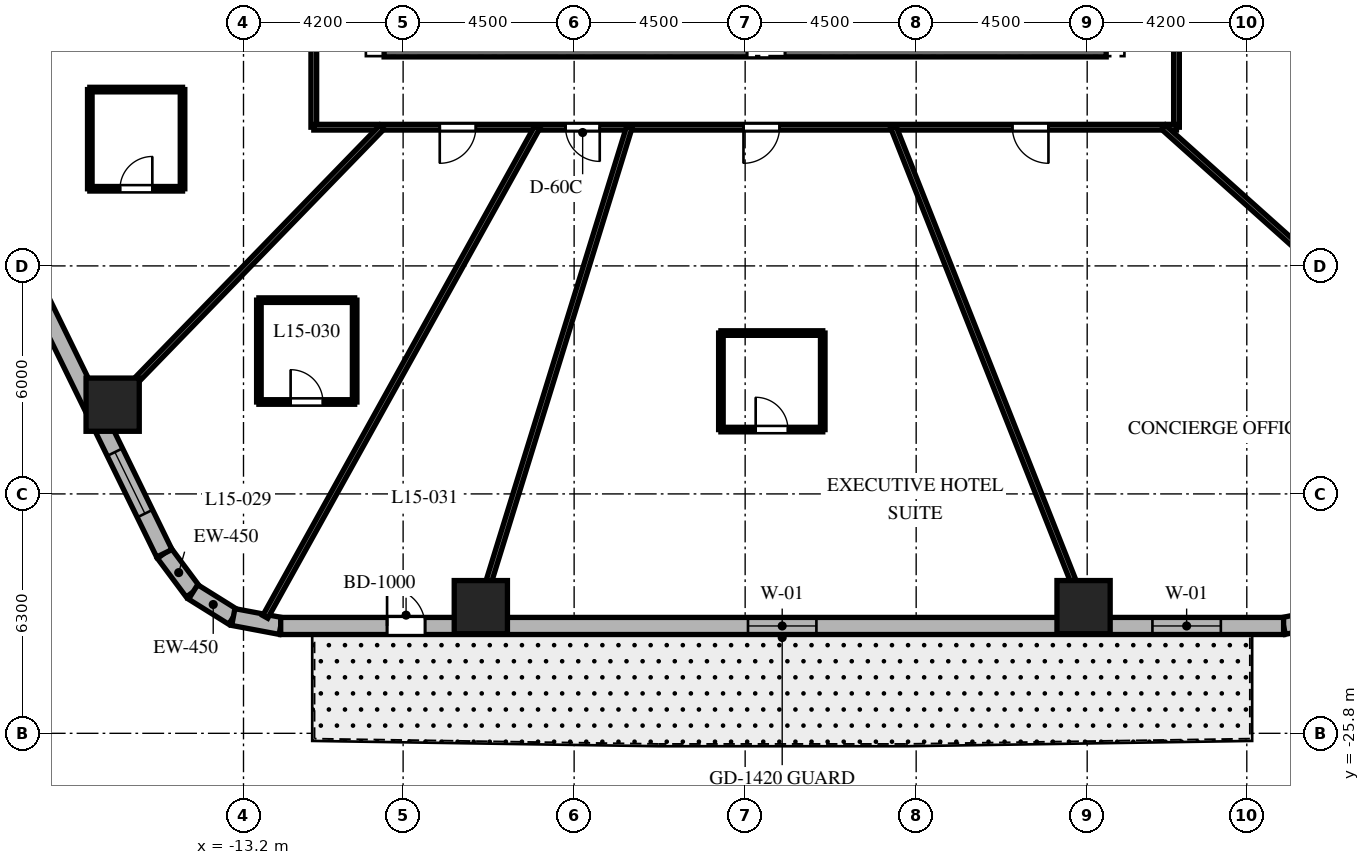
"""IFC4 building model, lengths in metres.
Left out: names, types, materials, properties, quantities, classifications, styles, units other than length and angle.
Written with IfcOpenShell. Run it as: python <this file> out.ifc"""

import sys

from ifc_helpers import new_model, si_unit, direction, frame, frame_2d, origin, origin_2d, place, context, subcontext, project, spatial, rectangle, extrude, element, fill, save


model = new_model("IFC4")
c1 = context("Model", 3, precision=1e-05, world=origin(), true_north=direction((0.0, 1.0)))
c2 = subcontext(c1, "Body", "Model", "MODEL_VIEW")
j1 = project(units=[si_unit("LENGTHUNIT", "METRE"), si_unit("PLANEANGLEUNIT", "RADIAN")], contexts=[c1])
p1 = place(None, origin())
s1 = spatial("IfcSite", under=j1, at=p1, CompositionType="ELEMENT")
p2 = place(p1, origin())
s2 = spatial("IfcBuilding", under=s1, at=p2, CompositionType="ELEMENT")
p3 = place(p2, frame((0.0, 0.0, 67.5)))
s3 = spatial("IfcBuildingStorey", under=s2, at=p3, CompositionType="ELEMENT", Elevation=67.5)
p4 = place(p3, frame((-9.5, -7.5, 0.0), z_axis=(0.0, 0.0, 1.0), x_axis=(1.0, 0.0, 0.0)))
e1 = element("IfcWall", 1, at=p4, inside=s3, PredefinedType="SHEAR", context=c2, shape_type="SweptSolid", body=[
    extrude(rectangle(XDim=19.0, YDim=1.0, at=frame_2d((9.5, 0.0))), origin(), (0.0, 0.0, 1.0), 3.7),
])
p5 = place(p4, frame((9.55, 0.0, 0.0)))
e2 = element("IfcOpeningElement", 2, at=p5, cuts=e1, PredefinedType="OPENING", context=c2, shape_type="SweptSolid", body=[
    extrude(rectangle(XDim=1.0, YDim=2.15, at=frame_2d((0.5, 1.075))), frame((0.0, 0.51, 0.0), z_axis=(0.0, -1.0, 0.0), x_axis=(1.0, 0.0, 0.0)), (0.0, 0.0, 1.0), 1.02),
])
for number, where, z_axis, x_axis in (
    (3, (-6.955, -22.48, 0.0), (0.0, 0.0, 1.0), (1.0, 0.0, 0.0)),
    (4, (8.905, -22.48, 0.0), (0.0, 0.0, 1.0), (1.0, 0.0, 0.0)),
    (5, (-16.643, -17.152, 0.0), (0.0, 0.0, 1.0), (1.0, 0.0, 0.0)),
):
    element("IfcColumn", number, at=place(p3, frame(where, z_axis=z_axis, x_axis=x_axis)), inside=s3, PredefinedType="COLUMN", context=c2, shape_type="SweptSolid", body=[
        extrude(rectangle(XDim=1.4, YDim=1.4, at=origin_2d()), origin(), (0.0, 0.0, 1.0), 3.7),
    ])
p6 = place(p3, frame((-15.284, -21.062, 0.0), z_axis=(0.0, 0.0, 1.0), x_axis=(0.597595366449, -0.801797841104, 0.0)))
e6 = element("IfcWall", 6, at=p6, inside=s3, PredefinedType="SOLIDWALL", context=c2, shape_type="SweptSolid", body=[
    extrude(rectangle(XDim=1.269, YDim=0.45, at=frame_2d((0.634, 0.0))), origin(), (0.0, 0.0, 1.0), 3.4),
])
p7 = place(p3, frame((-14.526, -22.08, 0.0), z_axis=(0.0, 0.0, 1.0), x_axis=(0.848185203596, -0.529699783275, 0.0)))
e7 = element("IfcWall", 7, at=p7, inside=s3, PredefinedType="SOLIDWALL", context=c2, shape_type="SweptSolid", body=[
    extrude(rectangle(XDim=1.247, YDim=0.45, at=frame_2d((0.624, 0.0))), origin(), (0.0, 0.0, 1.0), 3.4),
])
p8 = place(p3, frame((-13.468, -22.74, 0.0), z_axis=(0.0, 0.0, 1.0), x_axis=(0.982717174228, -0.185113358451, 0.0)))
e8 = element("IfcWall", 8, at=p8, inside=s3, PredefinedType="SOLIDWALL", context=c2, shape_type="SweptSolid", body=[
    extrude(rectangle(XDim=1.269, YDim=0.45, at=frame_2d((0.634, 0.0))), origin(), (0.0, 0.0, 1.0), 3.4),
])
p9 = place(p3, frame((14.168, -22.975, 0.0), z_axis=(0.0, 0.0, 1.0), x_axis=(0.978770371074, 0.204959900243, 0.0)))
e9 = element("IfcWall", 9, at=p9, inside=s3, PredefinedType="SOLIDWALL", context=c2, shape_type="SweptSolid", body=[
    extrude(rectangle(XDim=1.406, YDim=0.45, at=frame_2d((0.703, 0.0))), origin(), (0.0, 0.0, 1.0), 3.4),
])
p10 = place(p3, frame((-12.221, -22.975, 0.0), z_axis=(0.0, 0.0, 1.0), x_axis=(1.0, 0.0, 0.0)))
e10 = element("IfcWall", 10, at=p10, inside=s3, PredefinedType="SOLIDWALL", context=c2, shape_type="SweptSolid", body=[
    extrude(rectangle(XDim=26.389, YDim=0.45, at=frame_2d((13.195, 0.0))), origin(), (0.0, 0.0, 1.0), 3.4),
])
p11 = place(p10, frame((2.799, 0.0, 0.0)))
e11 = element("IfcOpeningElement", 11, at=p11, cuts=e10, PredefinedType="OPENING", context=c2, shape_type="SweptSolid", body=[
    extrude(rectangle(XDim=1.0, YDim=2.15, at=frame_2d((0.5, 1.075))), frame((0.0, 0.235, 0.0), z_axis=(0.0, -1.0, 0.0), x_axis=(1.0, 0.0, 0.0)), (0.0, 0.0, 1.0), 0.47),
])
p12 = place(p10, frame((12.296, 0.0, 0.8)))
e12 = element("IfcOpeningElement", 12, at=p12, cuts=e10, PredefinedType="OPENING", context=c2, shape_type="SweptSolid", body=[
    extrude(rectangle(XDim=1.8, YDim=1.8, at=frame_2d((0.9, 0.9))), frame((0.0, 0.235, 0.0), z_axis=(0.0, -1.0, 0.0), x_axis=(1.0, 0.0, 0.0)), (0.0, 0.0, 1.0), 0.47),
])
p13 = place(p10, frame((22.938, 0.0, 0.8)))
e13 = element("IfcOpeningElement", 13, at=p13, cuts=e10, PredefinedType="OPENING", context=c2, shape_type="SweptSolid", body=[
    extrude(rectangle(XDim=1.8, YDim=1.8, at=frame_2d((0.9, 0.9))), frame((0.0, 0.235, 0.0), z_axis=(0.0, -1.0, 0.0), x_axis=(1.0, 0.0, 0.0)), (0.0, 0.0, 1.0), 0.47),
])
p14 = place(p3, frame((-24.336, -2.532, 0.0), z_axis=(0.0, 0.0, 1.0), x_axis=(0.438931326393, -0.898520612291, 0.0)))
e14 = element("IfcWall", 14, at=p14, inside=s3, PredefinedType="SOLIDWALL", context=c2, shape_type="SweptSolid", body=[
    extrude(rectangle(XDim=20.623, YDim=0.45, at=frame_2d((10.312, 0.0))), origin(), (0.0, 0.0, 1.0), 3.4),
])
p15 = place(p14, frame((1.214, 0.0, 0.8)))
e15 = element("IfcOpeningElement", 15, at=p15, cuts=e14, PredefinedType="OPENING", context=c2, shape_type="SweptSolid", body=[
    extrude(rectangle(XDim=1.8, YDim=1.8, at=frame_2d((0.9, 0.9))), frame((0.0, 0.235, 0.0), z_axis=(0.0, -1.0, 0.0), x_axis=(1.0, 0.0, 0.0)), (0.0, 0.0, 1.0), 0.47),
])
p16 = place(p14, frame((9.462, 0.0, 0.8)))
e16 = element("IfcOpeningElement", 16, at=p16, cuts=e14, PredefinedType="OPENING", context=c2, shape_type="SweptSolid", body=[
    extrude(rectangle(XDim=1.8, YDim=1.8, at=frame_2d((0.9, 0.9))), frame((0.0, 0.235, 0.0), z_axis=(0.0, -1.0, 0.0), x_axis=(1.0, 0.0, 0.0)), (0.0, 0.0, 1.0), 0.47),
])
p17 = place(p14, frame((17.66, 0.0, 0.8)))
e17 = element("IfcOpeningElement", 17, at=p17, cuts=e14, PredefinedType="OPENING", context=c2, shape_type="SweptSolid", body=[
    extrude(rectangle(XDim=1.8, YDim=1.8, at=frame_2d((0.9, 0.9))), frame((0.0, 0.235, 0.0), z_axis=(0.0, -1.0, 0.0), x_axis=(1.0, 0.0, 0.0)), (0.0, 0.0, 1.0), 0.47),
])
p18 = place(p3, frame((-11.35, -9.85, 0.0), z_axis=(0.0, 0.0, 1.0), x_axis=(0.0, 1.0, 0.0)))
e18 = element("IfcWall", 18, at=p18, inside=s3, PredefinedType="PARTITIONING", context=c2, shape_type="SweptSolid", body=[
    extrude(rectangle(XDim=19.7, YDim=0.15, at=frame_2d((9.85, 0.0))), origin(), (0.0, 0.0, 1.0), 2.84),
])
p19 = place(p18, frame((16.714, 0.0, 0.0)))
e19 = element("IfcOpeningElement", 19, at=p19, cuts=e18, PredefinedType="OPENING", context=c2, shape_type="SweptSolid", body=[
    extrude(rectangle(XDim=0.95, YDim=2.03, at=frame_2d((0.475, 1.015))), frame((0.0, 0.085, 0.0), z_axis=(0.0, -1.0, 0.0), x_axis=(1.0, 0.0, 0.0)), (0.0, 0.0, 1.0), 0.17),
])
p20 = place(p18, frame((12.932, 0.0, 0.0)))
e20 = element("IfcOpeningElement", 20, at=p20, cuts=e18, PredefinedType="OPENING", context=c2, shape_type="SweptSolid", body=[
    extrude(rectangle(XDim=0.95, YDim=2.03, at=frame_2d((0.475, 1.015))), frame((0.0, 0.085, 0.0), z_axis=(0.0, -1.0, 0.0), x_axis=(1.0, 0.0, 0.0)), (0.0, 0.0, 1.0), 0.17),
])
p21 = place(p18, frame((8.838, 0.0, 0.0)))
e21 = element("IfcOpeningElement", 21, at=p21, cuts=e18, PredefinedType="OPENING", context=c2, shape_type="SweptSolid", body=[
    extrude(rectangle(XDim=0.95, YDim=2.03, at=frame_2d((0.475, 1.015))), frame((0.0, 0.085, 0.0), z_axis=(0.0, -1.0, 0.0), x_axis=(1.0, 0.0, 0.0)), (0.0, 0.0, 1.0), 0.17),
])
p22 = place(p18, frame((3.024, 0.0, 0.0)))
e22 = element("IfcOpeningElement", 22, at=p22, cuts=e18, PredefinedType="OPENING", context=c2, shape_type="SweptSolid", body=[
    extrude(rectangle(XDim=0.95, YDim=2.03, at=frame_2d((0.475, 1.015))), frame((0.0, 0.085, 0.0), z_axis=(0.0, -1.0, 0.0), x_axis=(1.0, 0.0, 0.0)), (0.0, 0.0, 1.0), 0.17),
])
p23 = place(p3, frame((11.35, 9.85, 0.0), z_axis=(0.0, 0.0, 1.0), x_axis=(0.0, -1.0, 0.0)))
e23 = element("IfcWall", 23, at=p23, inside=s3, PredefinedType="PARTITIONING", context=c2, shape_type="SweptSolid", body=[
    extrude(rectangle(XDim=19.7, YDim=0.15, at=frame_2d((9.85, 0.0))), origin(), (0.0, 0.0, 1.0), 2.84),
])
p24 = place(p23, frame((3.024, 0.0, 0.0)))
e24 = element("IfcOpeningElement", 24, at=p24, cuts=e23, PredefinedType="OPENING", context=c2, shape_type="SweptSolid", body=[
    extrude(rectangle(XDim=0.95, YDim=2.03, at=frame_2d((0.475, 1.015))), frame((0.0, 0.085, 0.0), z_axis=(0.0, -1.0, 0.0), x_axis=(1.0, 0.0, 0.0)), (0.0, 0.0, 1.0), 0.17),
])
p25 = place(p23, frame((15.191, 0.0, 0.0)))
e25 = element("IfcOpeningElement", 25, at=p25, cuts=e23, PredefinedType="OPENING", context=c2, shape_type="SweptSolid", body=[
    extrude(rectangle(XDim=0.95, YDim=2.03, at=frame_2d((0.475, 1.015))), frame((0.0, 0.085, 0.0), z_axis=(0.0, -1.0, 0.0), x_axis=(1.0, 0.0, 0.0)), (0.0, 0.0, 1.0), 0.17),
])
p26 = place(p23, frame((8.838, 0.0, 0.0)))
e26 = element("IfcOpeningElement", 26, at=p26, cuts=e23, PredefinedType="OPENING", context=c2, shape_type="SweptSolid", body=[
    extrude(rectangle(XDim=0.95, YDim=2.03, at=frame_2d((0.475, 1.015))), frame((0.0, 0.085, 0.0), z_axis=(0.0, -1.0, 0.0), x_axis=(1.0, 0.0, 0.0)), (0.0, 0.0, 1.0), 0.17),
])
p27 = place(p3, frame((11.35, -9.85, 0.0), z_axis=(0.0, 0.0, 1.0), x_axis=(-1.0, 0.0, 0.0)))
e27 = element("IfcWall", 27, at=p27, inside=s3, PredefinedType="PARTITIONING", context=c2, shape_type="SweptSolid", body=[
    extrude(rectangle(XDim=22.7, YDim=0.15, at=frame_2d((11.35, 0.0))), origin(), (0.0, 0.0, 1.0), 2.84),
])
p28 = place(p27, frame((18.436, 0.0, 0.0)))
e28 = element("IfcOpeningElement", 28, at=p28, cuts=e27, PredefinedType="OPENING", context=c2, shape_type="SweptSolid", body=[
    extrude(rectangle(XDim=0.95, YDim=2.03, at=frame_2d((0.475, 1.015))), frame((0.0, 0.085, 0.0), z_axis=(0.0, -1.0, 0.0), x_axis=(1.0, 0.0, 0.0)), (0.0, 0.0, 1.0), 0.17),
])
p29 = place(p27, frame((15.176, 0.0, 0.0)))
e29 = element("IfcOpeningElement", 29, at=p29, cuts=e27, PredefinedType="OPENING", context=c2, shape_type="SweptSolid", body=[
    extrude(rectangle(XDim=0.9, YDim=2.03, at=frame_2d((0.45, 1.015))), frame((0.0, 0.085, 0.0), z_axis=(0.0, -1.0, 0.0), x_axis=(1.0, 0.0, 0.0)), (0.0, 0.0, 1.0), 0.17),
])
p30 = place(p27, frame((10.444, 0.0, 0.0)))
e30 = element("IfcOpeningElement", 30, at=p30, cuts=e27, PredefinedType="OPENING", context=c2, shape_type="SweptSolid", body=[
    extrude(rectangle(XDim=0.95, YDim=2.03, at=frame_2d((0.475, 1.015))), frame((0.0, 0.085, 0.0), z_axis=(0.0, -1.0, 0.0), x_axis=(1.0, 0.0, 0.0)), (0.0, 0.0, 1.0), 0.17),
])
p31 = place(p27, frame((3.369, 0.0, 0.0)))
e31 = element("IfcOpeningElement", 31, at=p31, cuts=e27, PredefinedType="OPENING", context=c2, shape_type="SweptSolid", body=[
    extrude(rectangle(XDim=0.95, YDim=2.03, at=frame_2d((0.475, 1.015))), frame((0.0, 0.085, 0.0), z_axis=(0.0, -1.0, 0.0), x_axis=(1.0, 0.0, 0.0)), (0.0, 0.0, 1.0), 0.17),
])
p32 = place(p3, frame((-9.558, -9.85, 0.0), z_axis=(0.0, 0.0, 1.0), x_axis=(-0.69638346089, -0.717669893056, 0.0)))
e32 = element("IfcWall", 32, at=p32, inside=s3, PredefinedType="PARTITIONING", context=c2, shape_type="SweptSolid", body=[
    extrude(rectangle(XDim=10.701, YDim=0.15, at=frame_2d((5.351, 0.0))), origin(), (0.0, 0.0, 1.0), 2.54),
])
p33 = place(p3, frame((-5.471, -9.85, 0.0), z_axis=(0.0, 0.0, 1.0), x_axis=(-0.48553323157, -0.874218211341, 0.0)))
e33 = element("IfcWall", 33, at=p33, inside=s3, PredefinedType="PARTITIONING", context=c2, shape_type="SweptSolid", body=[
    extrude(rectangle(XDim=14.74, YDim=0.15, at=frame_2d((7.37, 0.0))), origin(), (0.0, 0.0, 1.0), 2.54),
])
p34 = place(p3, frame((-3.048, -9.85, 0.0), z_axis=(0.0, 0.0, 1.0), x_axis=(-0.295553992761, -0.955326037206, 0.0)))
e34 = element("IfcWall", 34, at=p34, inside=s3, PredefinedType="PARTITIONING", context=c2, shape_type="SweptSolid", body=[
    extrude(rectangle(XDim=13.739, YDim=0.15, at=frame_2d((6.869, 0.0))), origin(), (0.0, 0.0, 1.0), 2.54),
])
p35 = place(p3, frame((3.902, -9.85, 0.0), z_axis=(0.0, 0.0, 1.0), x_axis=(0.36828765711, -0.929711891728, 0.0)))
e35 = element("IfcWall", 35, at=p35, inside=s3, PredefinedType="PARTITIONING", context=c2, shape_type="SweptSolid", body=[
    extrude(rectangle(XDim=14.117, YDim=0.15, at=frame_2d((7.059, 0.0))), origin(), (0.0, 0.0, 1.0), 2.54),
])
p36 = place(p3, frame((11.007, -9.85, 0.0), z_axis=(0.0, 0.0, 1.0), x_axis=(0.745177305978, -0.666866390407, 0.0)))
e36 = element("IfcWall", 36, at=p36, inside=s3, PredefinedType="PARTITIONING", context=c2, shape_type="SweptSolid", body=[
    extrude(rectangle(XDim=10.375, YDim=0.15, at=frame_2d((5.188, 0.0))), origin(), (0.0, 0.0, 1.0), 2.54),
])
p37 = place(p3, frame((-17.244, -11.47, 0.0), z_axis=(0.0, 0.0, 1.0), x_axis=(1.0, 0.0, 0.0)))
e37 = element("IfcWall", 37, at=p37, inside=s3, PredefinedType="PARTITIONING", context=c2, shape_type="SweptSolid", body=[
    extrude(rectangle(XDim=2.44, YDim=0.12, at=frame_2d((1.22, 0.0))), origin(), (0.0, 0.0, 1.0), 2.927),
])
p38 = place(p37, frame((0.795, 0.0, 0.0)))
e38 = element("IfcOpeningElement", 38, at=p38, cuts=e37, PredefinedType="OPENING", context=c2, shape_type="SweptSolid", body=[
    extrude(rectangle(XDim=0.85, YDim=2.03, at=frame_2d((0.425, 1.015))), frame((0.0, 0.07, 0.0), z_axis=(0.0, -1.0, 0.0), x_axis=(1.0, 0.0, 0.0)), (0.0, 0.0, 1.0), 0.14),
])
p39 = place(p3, frame((-14.804, -11.47, 0.0), z_axis=(0.0, 0.0, 1.0), x_axis=(0.0, 1.0, 0.0)))
e39 = element("IfcWall", 39, at=p39, inside=s3, PredefinedType="PARTITIONING", context=c2, shape_type="SweptSolid", body=[
    extrude(rectangle(XDim=2.61, YDim=0.12, at=frame_2d((1.305, 0.0))), origin(), (0.0, 0.0, 1.0), 3.4),
])
p40 = place(p3, frame((-14.804, -8.86, 0.0), z_axis=(0.0, 0.0, 1.0), x_axis=(-1.0, 0.0, 0.0)))
e40 = element("IfcWall", 40, at=p40, inside=s3, PredefinedType="PARTITIONING", context=c2, shape_type="SweptSolid", body=[
    extrude(rectangle(XDim=2.44, YDim=0.12, at=frame_2d((1.22, 0.0))), origin(), (0.0, 0.0, 1.0), 2.927),
])
p41 = place(p3, frame((-17.244, -8.86, 0.0), z_axis=(0.0, 0.0, 1.0), x_axis=(0.0, -1.0, 0.0)))
e41 = element("IfcWall", 41, at=p41, inside=s3, PredefinedType="PARTITIONING", context=c2, shape_type="SweptSolid", body=[
    extrude(rectangle(XDim=2.61, YDim=0.12, at=frame_2d((1.305, 0.0))), origin(), (0.0, 0.0, 1.0), 3.4),
])
p42 = place(p3, frame((-12.795, -17.081, 0.0), z_axis=(0.0, 0.0, 1.0), x_axis=(1.0, 0.0, 0.0)))
e42 = element("IfcWall", 42, at=p42, inside=s3, PredefinedType="PARTITIONING", context=c2, shape_type="SweptSolid", body=[
    extrude(rectangle(XDim=2.52, YDim=0.12, at=frame_2d((1.26, 0.0))), origin(), (0.0, 0.0, 1.0), 3.4),
])
p43 = place(p42, frame((0.835, 0.0, 0.0)))
e43 = element("IfcOpeningElement", 43, at=p43, cuts=e42, PredefinedType="OPENING", context=c2, shape_type="SweptSolid", body=[
    extrude(rectangle(XDim=0.85, YDim=2.03, at=frame_2d((0.425, 1.015))), frame((0.0, 0.07, 0.0), z_axis=(0.0, -1.0, 0.0), x_axis=(1.0, 0.0, 0.0)), (0.0, 0.0, 1.0), 0.14),
])
p44 = place(p3, frame((-10.275, -17.081, 0.0), z_axis=(0.0, 0.0, 1.0), x_axis=(0.0, 1.0, 0.0)))
e44 = element("IfcWall", 44, at=p44, inside=s3, PredefinedType="PARTITIONING", context=c2, shape_type="SweptSolid", body=[
    extrude(rectangle(XDim=2.68, YDim=0.12, at=frame_2d((1.34, 0.0))), origin(), (0.0, 0.0, 1.0), 2.972),
])
p45 = place(p3, frame((-10.275, -14.401, 0.0), z_axis=(0.0, 0.0, 1.0), x_axis=(-1.0, 0.0, 0.0)))
e45 = element("IfcWall", 45, at=p45, inside=s3, PredefinedType="PARTITIONING", context=c2, shape_type="SweptSolid", body=[
    extrude(rectangle(XDim=2.52, YDim=0.12, at=frame_2d((1.26, 0.0))), origin(), (0.0, 0.0, 1.0), 3.4),
])
p46 = place(p3, frame((-12.795, -14.401, 0.0), z_axis=(0.0, 0.0, 1.0), x_axis=(0.0, -1.0, 0.0)))
e46 = element("IfcWall", 46, at=p46, inside=s3, PredefinedType="PARTITIONING", context=c2, shape_type="SweptSolid", body=[
    extrude(rectangle(XDim=2.68, YDim=0.12, at=frame_2d((1.34, 0.0))), origin(), (0.0, 0.0, 1.0), 2.972),
])
p47 = place(p3, frame((-0.638, -17.807, 0.0), z_axis=(0.0, 0.0, 1.0), x_axis=(1.0, 0.0, 0.0)))
e47 = element("IfcWall", 47, at=p47, inside=s3, PredefinedType="PARTITIONING", context=c2, shape_type="SweptSolid", body=[
    extrude(rectangle(XDim=2.68, YDim=0.12, at=frame_2d((1.34, 0.0))), origin(), (0.0, 0.0, 1.0), 2.84),
])
p48 = place(p47, frame((0.915, 0.0, 0.0)))
e48 = element("IfcOpeningElement", 48, at=p48, cuts=e47, PredefinedType="OPENING", context=c2, shape_type="SweptSolid", body=[
    extrude(rectangle(XDim=0.85, YDim=2.03, at=frame_2d((0.425, 1.015))), frame((0.0, 0.07, 0.0), z_axis=(0.0, -1.0, 0.0), x_axis=(1.0, 0.0, 0.0)), (0.0, 0.0, 1.0), 0.14),
])
p49 = place(p3, frame((2.042, -17.807, 0.0), z_axis=(0.0, 0.0, 1.0), x_axis=(0.0, 1.0, 0.0)))
e49 = element("IfcWall", 49, at=p49, inside=s3, PredefinedType="PARTITIONING", context=c2, shape_type="SweptSolid", body=[
    extrude(rectangle(XDim=2.54, YDim=0.12, at=frame_2d((1.27, 0.0))), origin(), (0.0, 0.0, 1.0), 2.84),
])
p50 = place(p3, frame((2.042, -15.267, 0.0), z_axis=(0.0, 0.0, 1.0), x_axis=(-1.0, 0.0, 0.0)))
e50 = element("IfcWall", 50, at=p50, inside=s3, PredefinedType="PARTITIONING", context=c2, shape_type="SweptSolid", body=[
    extrude(rectangle(XDim=2.68, YDim=0.12, at=frame_2d((1.34, 0.0))), origin(), (0.0, 0.0, 1.0), 3.4),
])
p51 = place(p3, frame((-0.638, -15.267, 0.0), z_axis=(0.0, 0.0, 1.0), x_axis=(0.0, -1.0, 0.0)))
e51 = element("IfcWall", 51, at=p51, inside=s3, PredefinedType="PARTITIONING", context=c2, shape_type="SweptSolid", body=[
    extrude(rectangle(XDim=2.54, YDim=0.12, at=frame_2d((1.27, 0.0))), origin(), (0.0, 0.0, 1.0), 2.84),
])
p52 = place(p11, origin())
e52 = element("IfcDoor", 52, at=p52, inside=s3, OperationType="SINGLE_SWING_LEFT", PredefinedType="DOOR", context=c2, shape_type="SweptSolid", body=[
    extrude(rectangle(XDim=1.0, YDim=2.15, at=frame_2d((0.5, 1.075))), frame((0.0, 0.025, 0.0), z_axis=(0.0, -1.0, 0.0), x_axis=(1.0, 0.0, 0.0)), (0.0, 0.0, 1.0), 0.05),
])
fill(e11, e52)
p53 = place(p12, origin())
e53 = element("IfcWindow", 53, at=p53, inside=s3, PartitioningType="SINGLE_PANEL", PredefinedType="WINDOW", context=c2, shape_type="SweptSolid", body=[
    extrude(rectangle(XDim=1.8, YDim=1.8, at=frame_2d((0.9, 0.9))), frame((0.0, 0.03, 0.0), z_axis=(0.0, -1.0, 0.0), x_axis=(1.0, 0.0, 0.0)), (0.0, 0.0, 1.0), 0.06),
])
fill(e12, e53)
p54 = place(p13, origin())
e54 = element("IfcWindow", 54, at=p54, inside=s3, PartitioningType="SINGLE_PANEL", PredefinedType="WINDOW", context=c2, shape_type="SweptSolid", body=[
    extrude(rectangle(XDim=1.8, YDim=1.8, at=frame_2d((0.9, 0.9))), frame((0.0, 0.03, 0.0), z_axis=(0.0, -1.0, 0.0), x_axis=(1.0, 0.0, 0.0)), (0.0, 0.0, 1.0), 0.06),
])
fill(e13, e54)
p55 = place(p17, origin())
e55 = element("IfcWindow", 55, at=p55, inside=s3, PartitioningType="SINGLE_PANEL", PredefinedType="WINDOW", context=c2, shape_type="SweptSolid", body=[
    extrude(rectangle(XDim=1.8, YDim=1.8, at=frame_2d((0.9, 0.9))), frame((0.0, 0.03, 0.0), z_axis=(0.0, -1.0, 0.0), x_axis=(1.0, 0.0, 0.0)), (0.0, 0.0, 1.0), 0.06),
])
fill(e17, e55)
p56 = place(p38, origin())
e56 = element("IfcDoor", 56, at=p56, inside=s3, OperationType="SINGLE_SWING_RIGHT", PredefinedType="DOOR", context=c2, shape_type="SweptSolid", body=[
    extrude(rectangle(XDim=0.85, YDim=2.03, at=frame_2d((0.425, 1.015))), frame((0.0, 0.025, 0.0), z_axis=(0.0, -1.0, 0.0), x_axis=(1.0, 0.0, 0.0)), (0.0, 0.0, 1.0), 0.05),
])
fill(e38, e56)
p57 = place(p28, origin())
e57 = element("IfcDoor", 57, at=p57, inside=s3, OperationType="SINGLE_SWING_RIGHT", PredefinedType="DOOR", context=c2, shape_type="SweptSolid", body=[
    extrude(rectangle(XDim=0.95, YDim=2.03, at=frame_2d((0.475, 1.015))), frame((0.0, 0.025, 0.0), z_axis=(0.0, -1.0, 0.0), x_axis=(1.0, 0.0, 0.0)), (0.0, 0.0, 1.0), 0.05),
])
fill(e28, e57)
p58 = place(p43, origin())
e58 = element("IfcDoor", 58, at=p58, inside=s3, OperationType="SINGLE_SWING_LEFT", PredefinedType="DOOR", context=c2, shape_type="SweptSolid", body=[
    extrude(rectangle(XDim=0.85, YDim=2.03, at=frame_2d((0.425, 1.015))), frame((0.0, 0.025, 0.0), z_axis=(0.0, -1.0, 0.0), x_axis=(1.0, 0.0, 0.0)), (0.0, 0.0, 1.0), 0.05),
])
fill(e43, e58)
p59 = place(p29, origin())
e59 = element("IfcDoor", 59, at=p59, inside=s3, OperationType="SINGLE_SWING_LEFT", PredefinedType="DOOR", context=c2, shape_type="SweptSolid", body=[
    extrude(rectangle(XDim=0.9, YDim=2.03, at=frame_2d((0.45, 1.015))), frame((0.0, 0.025, 0.0), z_axis=(0.0, -1.0, 0.0), x_axis=(1.0, 0.0, 0.0)), (0.0, 0.0, 1.0), 0.05),
])
fill(e29, e59)
p60 = place(p30, origin())
e60 = element("IfcDoor", 60, at=p60, inside=s3, OperationType="SINGLE_SWING_RIGHT", PredefinedType="DOOR", context=c2, shape_type="SweptSolid", body=[
    extrude(rectangle(XDim=0.95, YDim=2.03, at=frame_2d((0.475, 1.015))), frame((0.0, 0.025, 0.0), z_axis=(0.0, -1.0, 0.0), x_axis=(1.0, 0.0, 0.0)), (0.0, 0.0, 1.0), 0.05),
])
fill(e30, e60)
p61 = place(p48, origin())
e61 = element("IfcDoor", 61, at=p61, inside=s3, OperationType="SINGLE_SWING_LEFT", PredefinedType="DOOR", context=c2, shape_type="SweptSolid", body=[
    extrude(rectangle(XDim=0.85, YDim=2.03, at=frame_2d((0.425, 1.015))), frame((0.0, 0.025, 0.0), z_axis=(0.0, -1.0, 0.0), x_axis=(1.0, 0.0, 0.0)), (0.0, 0.0, 1.0), 0.05),
])
fill(e48, e61)
p62 = place(p31, origin())
e62 = element("IfcDoor", 62, at=p62, inside=s3, OperationType="SINGLE_SWING_LEFT", PredefinedType="DOOR", context=c2, shape_type="SweptSolid", body=[
    extrude(rectangle(XDim=0.95, YDim=2.03, at=frame_2d((0.475, 1.015))), frame((0.0, 0.025, 0.0), z_axis=(0.0, -1.0, 0.0), x_axis=(1.0, 0.0, 0.0)), (0.0, 0.0, 1.0), 0.05),
])
fill(e31, e62)
save(model, sys.argv[1])
